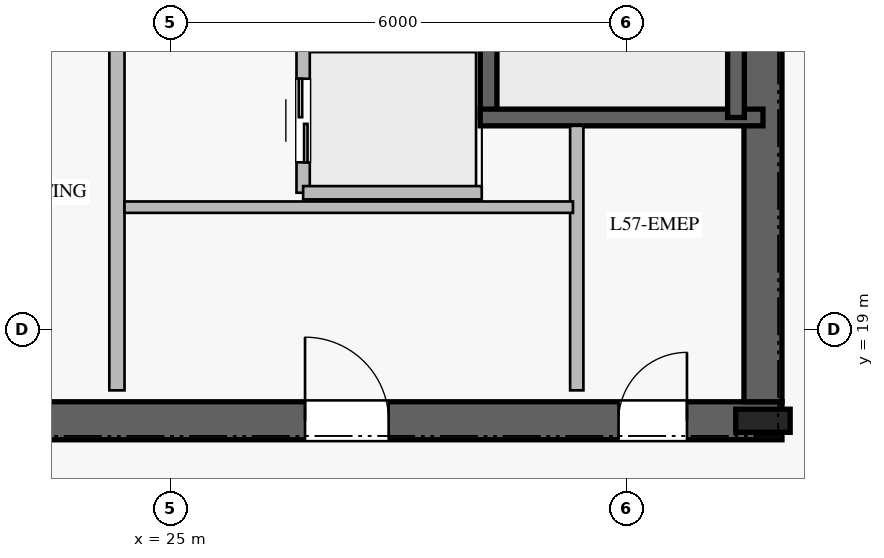
"""IFC4 building model, lengths in metres.
Left out: names, types, materials, properties, quantities, classifications, styles, units other than length and angle.
Written with IfcOpenShell. Run it as: python <this file> out.ifc"""

import sys

from ifc_helpers import new_model, si_unit, direction, frame, frame_2d, origin, origin_2d, place, context, subcontext, project, spatial, rectangle, i_section, extrude, element, fill, save


model = new_model("IFC4")
c1 = context("Model", 3, precision=1e-05, world=origin(), true_north=direction((0.0, 1.0)))
c2 = subcontext(c1, "Body", "Model", "MODEL_VIEW")
j1 = project(units=[si_unit("LENGTHUNIT", "METRE"), si_unit("PLANEANGLEUNIT", "RADIAN")], contexts=[c1])
p1 = place(None, origin())
s1 = spatial("IfcSite", under=j1, at=p1, CompositionType="ELEMENT")
p2 = place(p1, origin())
s2 = spatial("IfcBuilding", under=s1, at=p2, CompositionType="ELEMENT")
p3 = place(p2, frame((0.0, 0.0, 236.8)))
s3 = spatial("IfcBuildingStorey", under=s2, at=p3, CompositionType="ELEMENT", Elevation=236.8)
p4 = place(p3, frame((16.95, 17.8, 0.0), z_axis=(0.0, 0.0, 1.0), x_axis=(1.0, 0.0, 0.0)))
e1 = element("IfcWall", 1, at=p4, inside=s3, PredefinedType="SHEAR", context=c2, shape_type="SweptSolid", body=[
    extrude(rectangle(XDim=16.1, YDim=0.5, at=frame_2d((8.05, 0.0))), origin(), (0.0, 0.0, 1.0), 3.78),
])
p5 = place(p4, frame((5.0, 0.0, 0.0)))
e2 = element("IfcOpeningElement", 2, at=p5, cuts=e1, PredefinedType="OPENING", context=c2, shape_type="SweptSolid", body=[
    extrude(rectangle(XDim=1.2, YDim=2.25, at=frame_2d((0.6, 1.125))), frame((0.0, 0.26, 0.0), z_axis=(0.0, -1.0, 0.0), x_axis=(1.0, 0.0, 0.0)), (0.0, 0.0, 1.0), 0.52),
])
p6 = place(p4, frame((13.95, 0.0, 0.0)))
e3 = element("IfcOpeningElement", 3, at=p6, cuts=e1, PredefinedType="OPENING", context=c2, shape_type="SweptSolid", body=[
    extrude(rectangle(XDim=0.9, YDim=2.1, at=frame_2d((0.45, 1.05))), frame((0.0, 0.26, 0.0), z_axis=(0.0, -1.0, 0.0), x_axis=(1.0, 0.0, 0.0)), (0.0, 0.0, 1.0), 0.52),
])
p7 = place(p4, frame((9.825, 0.0, 0.0)))
e4 = element("IfcOpeningElement", 4, at=p7, cuts=e1, PredefinedType="OPENING", context=c2, shape_type="SweptSolid", body=[
    extrude(rectangle(XDim=1.1, YDim=2.2, at=frame_2d((0.55, 1.1))), frame((0.0, 0.26, 0.0), z_axis=(0.0, -1.0, 0.0), x_axis=(1.0, 0.0, 0.0)), (0.0, 0.0, 1.0), 0.52),
])
p8 = place(p3, frame((32.8, 18.05, 0.0), z_axis=(0.0, 0.0, 1.0), x_axis=(0.0, 1.0, 0.0)))
e5 = element("IfcWall", 5, at=p8, inside=s3, PredefinedType="SHEAR", context=c2, shape_type="SweptSolid", body=[
    extrude(rectangle(XDim=13.9, YDim=0.5, at=frame_2d((6.95, 0.0))), origin(), (0.0, 0.0, 1.0), 3.78),
])
p9 = place(p3, frame((32.8, 17.8, 0.0), z_axis=(0.0, 0.0, 1.0), x_axis=(1.0, 0.0, 0.0)))
e6 = element("IfcColumn", 6, at=p9, inside=s3, PredefinedType="COLUMN", context=c2, shape_type="SweptSolid", body=[
    extrude(i_section(OverallWidth=0.304, OverallDepth=0.716, WebThickness=0.021, FlangeThickness=0.04, at=origin_2d()), origin(), (0.0, 0.0, 1.0), 4.0),
])
p10 = place(p3, frame((29.19, 21.79, 0.0), z_axis=(0.0, 0.0, 1.0), x_axis=(0.0, 1.0, 0.0)))
e7 = element("IfcWall", 7, at=p10, inside=s3, PredefinedType="SOLIDWALL", context=c2, shape_type="SweptSolid", body=[
    extrude(rectangle(XDim=7.22, YDim=0.22, at=frame_2d((3.61, 0.0))), origin(), (0.0, 0.0, 1.0), 3.78),
])
p11 = place(p10, frame((5.88, 0.0, 0.0)))
e8 = element("IfcOpeningElement", 8, at=p11, cuts=e7, PredefinedType="OPENING", context=c2, shape_type="SweptSolid", body=[
    extrude(rectangle(XDim=1.15, YDim=2.2, at=frame_2d((0.575, 1.1))), frame((0.0, 0.12, 0.0), z_axis=(0.0, -1.0, 0.0), x_axis=(1.0, 0.0, 0.0)), (0.0, 0.0, 1.0), 0.24),
])
p12 = place(p3, frame((29.08, 21.79, 0.0), z_axis=(0.0, 0.0, 1.0), x_axis=(1.0, 0.0, 0.0)))
e9 = element("IfcWall", 9, at=p12, inside=s3, PredefinedType="SOLIDWALL", context=c2, shape_type="SweptSolid", body=[
    extrude(rectangle(XDim=3.72, YDim=0.22, at=frame_2d((1.86, 0.0))), origin(), (0.0, 0.0, 1.0), 3.78),
])
p13 = place(p3, frame((32.445, 29.01, 0.0), z_axis=(0.0, 0.0, 1.0), x_axis=(0.0, -1.0, 0.0)))
e10 = element("IfcWall", 10, at=p13, inside=s3, PredefinedType="SOLIDWALL", context=c2, shape_type="SweptSolid", body=[
    extrude(rectangle(XDim=7.22, YDim=0.22, at=frame_2d((3.61, 0.0))), origin(), (0.0, 0.0, 1.0), 3.78),
])
p14 = place(p3, frame((24.3, 18.2, 0.0), z_axis=(0.0, 0.0, 1.0), x_axis=(0.0, 1.0, 0.0)))
e11 = element("IfcWall", 11, at=p14, inside=s3, PredefinedType="PARTITIONING", context=c2, shape_type="SweptSolid", body=[
    extrude(rectangle(XDim=5.15, YDim=0.2, at=frame_2d((2.575, 0.0))), origin(), (0.0, 0.0, 1.0), 3.78),
])
p15 = place(p3, frame((30.35, 18.2, 0.0), z_axis=(0.0, 0.0, 1.0), x_axis=(0.0, 1.0, 0.0)))
e12 = element("IfcWall", 12, at=p15, inside=s3, PredefinedType="PARTITIONING", context=c2, shape_type="SweptSolid", body=[
    extrude(rectangle(XDim=3.48, YDim=0.175, at=frame_2d((1.74, 0.0))), origin(), (0.0, 0.0, 1.0), 3.78),
])
p16 = place(p3, frame((24.4, 20.61, 0.0), z_axis=(0.0, 0.0, 1.0), x_axis=(1.0, 0.0, 0.0)))
e13 = element("IfcWall", 13, at=p16, inside=s3, PredefinedType="PARTITIONING", context=c2, shape_type="SweptSolid", body=[
    extrude(rectangle(XDim=5.9, YDim=0.15, at=frame_2d((2.95, 0.0))), origin(), (0.0, 0.0, 1.0), 3.78),
])
p17 = place(p3, frame((26.75, 20.8, 0.0), z_axis=(0.0, 0.0, 1.0), x_axis=(0.0, 1.0, 0.0)))
e14 = element("IfcWall", 14, at=p17, inside=s3, PredefinedType="PARTITIONING", context=c2, shape_type="SweptSolid", body=[
    extrude(rectangle(XDim=1.9, YDim=0.175, at=frame_2d((0.95, 0.0))), origin(), (0.0, 0.0, 1.0), 3.78),
])
p18 = place(p17, frame((0.4, 0.0, 0.0)))
e15 = element("IfcOpeningElement", 15, at=p18, cuts=e14, PredefinedType="OPENING", context=c2, shape_type="SweptSolid", body=[
    extrude(rectangle(XDim=1.1, YDim=2.2, at=frame_2d((0.55, 1.1))), frame((0.0, 0.098, 0.0), z_axis=(0.0, -1.0, 0.0), x_axis=(1.0, 0.0, 0.0)), (0.0, 0.0, 1.0), 0.195),
])
p19 = place(p3, frame((26.75, 20.8, 0.0), z_axis=(0.0, 0.0, 1.0), x_axis=(1.0, 0.0, 0.0)))
e16 = element("IfcWall", 16, at=p19, inside=s3, PredefinedType="PARTITIONING", context=c2, shape_type="SweptSolid", body=[
    extrude(rectangle(XDim=2.35, YDim=0.175, at=frame_2d((1.175, 0.0))), origin(), (0.0, 0.0, 1.0), 3.78),
])
p20 = place(p6, origin())
e17 = element("IfcDoor", 17, at=p20, inside=s3, OperationType="SINGLE_SWING_RIGHT", PredefinedType="DOOR", context=c2, shape_type="SweptSolid", body=[
    extrude(rectangle(XDim=0.9, YDim=2.1, at=frame_2d((0.45, 1.05))), frame((0.0, 0.025, 0.0), z_axis=(0.0, -1.0, 0.0), x_axis=(1.0, 0.0, 0.0)), (0.0, 0.0, 1.0), 0.05),
])
fill(e3, e17)
p21 = place(p7, origin())
e18 = element("IfcDoor", 18, at=p21, inside=s3, OperationType="SINGLE_SWING_LEFT", PredefinedType="DOOR", context=c2, shape_type="SweptSolid", body=[
    extrude(rectangle(XDim=1.1, YDim=2.2, at=frame_2d((0.55, 1.1))), frame((0.0, 0.025, 0.0), z_axis=(0.0, -1.0, 0.0), x_axis=(1.0, 0.0, 0.0)), (0.0, 0.0, 1.0), 0.05),
])
fill(e4, e18)
p22 = place(p18, origin())
e19 = element("IfcDoor", 19, at=p22, inside=s3, OperationType="DOUBLE_DOOR_SLIDING", PredefinedType="DOOR", context=c2, shape_type="SweptSolid", body=[
    extrude(rectangle(XDim=1.1, YDim=2.2, at=frame_2d((0.55, 1.1))), frame((0.0, 0.025, 0.0), z_axis=(0.0, -1.0, 0.0), x_axis=(1.0, 0.0, 0.0)), (0.0, 0.0, 1.0), 0.05),
])
fill(e15, e19)
save(model, sys.argv[1])
